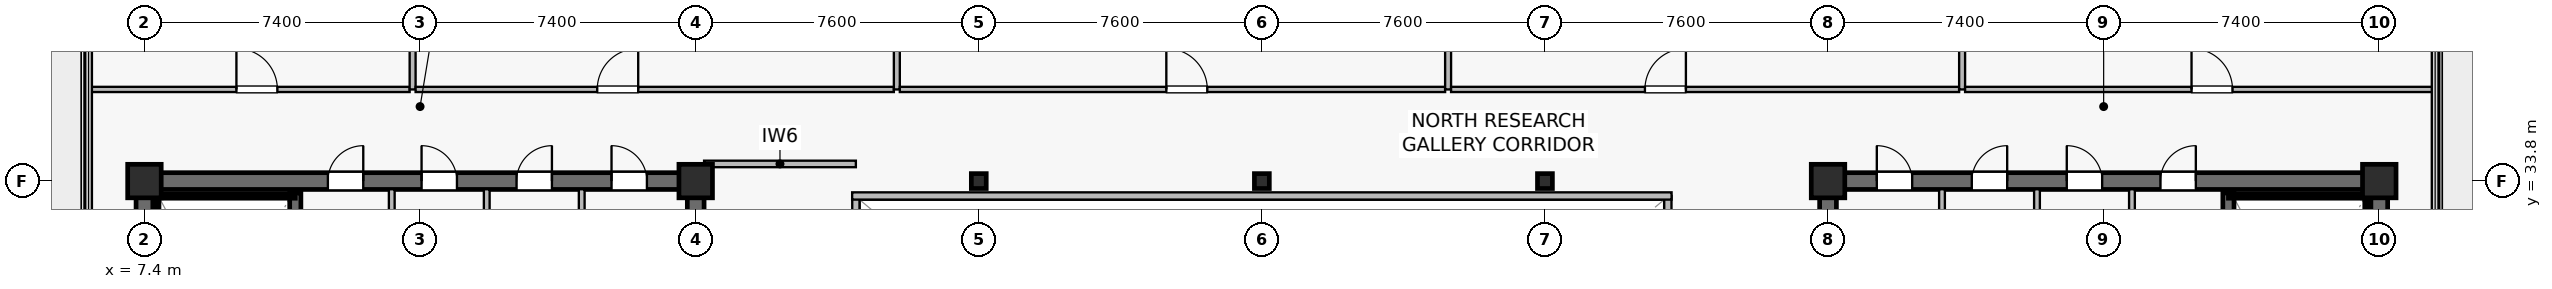
"""IFC4 building model, lengths in metres.
Left out: names, types, materials, properties, quantities, classifications, styles, units other than length and angle.
Written with IfcOpenShell. Run it as: python <this file> out.ifc"""

import sys

from ifc_helpers import new_model, si_unit, direction, frame, frame_2d, origin, origin_2d, place, context, subcontext, project, spatial, rectangle, i_section, extrude, source, transform, mapped, element, fill, save


model = new_model("IFC4")
c1 = context("Model", 3, precision=1e-05, world=origin(), true_north=direction((0.0, 1.0)))
c2 = subcontext(c1, "Body", "Model", "MODEL_VIEW")
j1 = project(units=[si_unit("LENGTHUNIT", "METRE"), si_unit("PLANEANGLEUNIT", "RADIAN")], contexts=[c1])
p1 = place(None, origin())
s1 = spatial("IfcSite", under=j1, at=p1, CompositionType="ELEMENT")
p2 = place(p1, origin())
s2 = spatial("IfcBuilding", under=s1, at=p2, CompositionType="ELEMENT")
p3 = place(p2, frame((0.0, 0.0, 297.6)))
s3 = spatial("IfcBuildingStorey", under=s2, at=p3, CompositionType="ELEMENT", Elevation=297.6)
p4 = place(p3, frame((7.175, 33.8, 0.0), z_axis=(0.0, 0.0, 1.0), x_axis=(1.0, 0.0, 0.0)))
e1 = element("IfcWall", 1, at=p4, inside=s3, PredefinedType="SHEAR", context=c2, shape_type="SweptSolid", body=[
    extrude(rectangle(XDim=15.25, YDim=0.45, at=frame_2d((7.625, 0.0))), origin(), (0.0, 0.0, 1.0), 3.9),
])
p5 = place(p4, frame((5.15, 0.0, 0.0)))
e2 = element("IfcOpeningElement", 2, at=p5, cuts=e1, PredefinedType="OPENING", context=c2, shape_type="SweptSolid", body=[
    extrude(rectangle(XDim=0.95, YDim=2.15, at=frame_2d((0.475, 1.075))), frame((0.0, 0.235, 0.0), z_axis=(0.0, -1.0, 0.0), x_axis=(1.0, 0.0, 0.0)), (0.0, 0.0, 1.0), 0.47),
])
p6 = place(p4, frame((7.665, 0.0, 0.0)))
e3 = element("IfcOpeningElement", 3, at=p6, cuts=e1, PredefinedType="OPENING", context=c2, shape_type="SweptSolid", body=[
    extrude(rectangle(XDim=0.95, YDim=2.15, at=frame_2d((0.475, 1.075))), frame((0.0, 0.235, 0.0), z_axis=(0.0, -1.0, 0.0), x_axis=(1.0, 0.0, 0.0)), (0.0, 0.0, 1.0), 0.47),
])
p7 = place(p4, frame((10.215, 0.0, 0.0)))
e4 = element("IfcOpeningElement", 4, at=p7, cuts=e1, PredefinedType="OPENING", context=c2, shape_type="SweptSolid", body=[
    extrude(rectangle(XDim=0.95, YDim=2.15, at=frame_2d((0.475, 1.075))), frame((0.0, 0.235, 0.0), z_axis=(0.0, -1.0, 0.0), x_axis=(1.0, 0.0, 0.0)), (0.0, 0.0, 1.0), 0.47),
])
p8 = place(p4, frame((12.765, 0.0, 0.0)))
e5 = element("IfcOpeningElement", 5, at=p8, cuts=e1, PredefinedType="OPENING", context=c2, shape_type="SweptSolid", body=[
    extrude(rectangle(XDim=0.95, YDim=2.15, at=frame_2d((0.475, 1.075))), frame((0.0, 0.235, 0.0), z_axis=(0.0, -1.0, 0.0), x_axis=(1.0, 0.0, 0.0)), (0.0, 0.0, 1.0), 0.47),
])
p9 = place(p3, frame((7.4, 15.025, 0.0), z_axis=(0.0, 0.0, 1.0), x_axis=(0.0, 1.0, 0.0)))
e6 = element("IfcWall", 6, at=p9, inside=s3, PredefinedType="SHEAR", context=c2, shape_type="SweptSolid", body=[
    extrude(rectangle(XDim=18.55, YDim=0.45, at=frame_2d((9.275, 0.0))), origin(), (0.0, 0.0, 1.0), 3.9),
])
p10 = place(p3, frame((22.2, 15.025, 0.0), z_axis=(0.0, 0.0, 1.0), x_axis=(0.0, 1.0, 0.0)))
e7 = element("IfcWall", 7, at=p10, inside=s3, PredefinedType="SHEAR", context=c2, shape_type="SweptSolid", body=[
    extrude(rectangle(XDim=18.55, YDim=0.45, at=frame_2d((9.275, 0.0))), origin(), (0.0, 0.0, 1.0), 3.9),
])
p11 = place(p10, frame((3.525, 0.0, 0.0)))
e8 = element("IfcOpeningElement", 8, at=p11, cuts=e7, PredefinedType="OPENING", context=c2, shape_type="SweptSolid", body=[
    extrude(rectangle(XDim=1.42, YDim=2.2, at=frame_2d((0.71, 1.1))), frame((0.0, 0.235, 0.0), z_axis=(0.0, -1.0, 0.0), x_axis=(1.0, 0.0, 0.0)), (0.0, 0.0, 1.0), 0.47),
])
p12 = place(p3, frame((11.45, 24.85, 0.0), z_axis=(0.0, 0.0, 1.0), x_axis=(0.0, 1.0, 0.0)))
e9 = element("IfcWall", 9, at=p12, inside=s3, PredefinedType="SHEAR", context=c2, shape_type="SweptSolid", body=[
    extrude(rectangle(XDim=8.63, YDim=0.3, at=frame_2d((4.315, 0.0))), origin(), (0.0, 0.0, 1.0), 3.9),
])
p13 = place(p12, frame((0.42, 0.0, 0.0)))
e10 = element("IfcOpeningElement", 10, at=p13, cuts=e9, PredefinedType="OPENING", context=c2, shape_type="SweptSolid", body=[
    extrude(rectangle(XDim=1.1, YDim=2.15, at=frame_2d((0.55, 1.075))), frame((0.0, 0.16, 0.0), z_axis=(0.0, -1.0, 0.0), x_axis=(1.0, 0.0, 0.0)), (0.0, 0.0, 1.0), 0.32),
])
p14 = place(p3, frame((7.73, 33.4, 0.0), z_axis=(0.0, 0.0, 1.0), x_axis=(1.0, 0.0, 0.0)))
e11 = element("IfcWall", 11, at=p14, inside=s3, PredefinedType="SOLIDWALL", context=c2, shape_type="SweptSolid", body=[
    extrude(rectangle(XDim=3.72, YDim=0.12, at=frame_2d((1.86, 0.0))), origin(), (0.0, 0.0, 1.0), 3.9),
])
p15 = place(p3, frame((7.73, 25.0, 0.0), z_axis=(0.0, 0.0, 1.0), x_axis=(0.0, 1.0, 0.0)))
e12 = element("IfcWall", 12, at=p15, inside=s3, PredefinedType="SOLIDWALL", context=c2, shape_type="SweptSolid", body=[
    extrude(rectangle(XDim=8.32, YDim=0.12, at=frame_2d((4.16, 0.0))), origin(), (0.0, 0.0, 1.0), 3.9),
])
p16 = place(p3, frame((52.375, 33.8, 0.0), z_axis=(0.0, 0.0, 1.0), x_axis=(1.0, 0.0, 0.0)))
e13 = element("IfcWall", 13, at=p16, inside=s3, PredefinedType="SHEAR", context=c2, shape_type="SweptSolid", body=[
    extrude(rectangle(XDim=15.25, YDim=0.45, at=frame_2d((7.625, 0.0))), origin(), (0.0, 0.0, 1.0), 3.9),
])
p17 = place(p16, frame((9.15, 0.0, 0.0)))
e14 = element("IfcOpeningElement", 14, at=p17, cuts=e13, PredefinedType="OPENING", context=c2, shape_type="SweptSolid", body=[
    extrude(rectangle(XDim=0.95, YDim=2.15, at=frame_2d((0.475, 1.075))), frame((0.0, 0.235, 0.0), z_axis=(0.0, -1.0, 0.0), x_axis=(1.0, 0.0, 0.0)), (0.0, 0.0, 1.0), 0.47),
])
p18 = place(p16, frame((6.635, 0.0, 0.0)))
e15 = element("IfcOpeningElement", 15, at=p18, cuts=e13, PredefinedType="OPENING", context=c2, shape_type="SweptSolid", body=[
    extrude(rectangle(XDim=0.95, YDim=2.15, at=frame_2d((0.475, 1.075))), frame((0.0, 0.235, 0.0), z_axis=(0.0, -1.0, 0.0), x_axis=(1.0, 0.0, 0.0)), (0.0, 0.0, 1.0), 0.47),
])
p19 = place(p16, frame((4.085, 0.0, 0.0)))
e16 = element("IfcOpeningElement", 16, at=p19, cuts=e13, PredefinedType="OPENING", context=c2, shape_type="SweptSolid", body=[
    extrude(rectangle(XDim=0.95, YDim=2.15, at=frame_2d((0.475, 1.075))), frame((0.0, 0.235, 0.0), z_axis=(0.0, -1.0, 0.0), x_axis=(1.0, 0.0, 0.0)), (0.0, 0.0, 1.0), 0.47),
])
p20 = place(p16, frame((1.535, 0.0, 0.0)))
e17 = element("IfcOpeningElement", 17, at=p20, cuts=e13, PredefinedType="OPENING", context=c2, shape_type="SweptSolid", body=[
    extrude(rectangle(XDim=0.95, YDim=2.15, at=frame_2d((0.475, 1.075))), frame((0.0, 0.235, 0.0), z_axis=(0.0, -1.0, 0.0), x_axis=(1.0, 0.0, 0.0)), (0.0, 0.0, 1.0), 0.47),
])
p21 = place(p3, frame((52.6, 15.025, 0.0), z_axis=(0.0, 0.0, 1.0), x_axis=(0.0, 1.0, 0.0)))
e18 = element("IfcWall", 18, at=p21, inside=s3, PredefinedType="SHEAR", context=c2, shape_type="SweptSolid", body=[
    extrude(rectangle(XDim=18.55, YDim=0.45, at=frame_2d((9.275, 0.0))), origin(), (0.0, 0.0, 1.0), 3.9),
])
p22 = place(p21, frame((3.525, 0.0, 0.0)))
e19 = element("IfcOpeningElement", 19, at=p22, cuts=e18, PredefinedType="OPENING", context=c2, shape_type="SweptSolid", body=[
    extrude(rectangle(XDim=1.42, YDim=2.2, at=frame_2d((0.71, 1.1))), frame((0.0, 0.235, 0.0), z_axis=(0.0, -1.0, 0.0), x_axis=(1.0, 0.0, 0.0)), (0.0, 0.0, 1.0), 0.47),
])
p23 = place(p3, frame((67.4, 15.025, 0.0), z_axis=(0.0, 0.0, 1.0), x_axis=(0.0, 1.0, 0.0)))
e20 = element("IfcWall", 20, at=p23, inside=s3, PredefinedType="SHEAR", context=c2, shape_type="SweptSolid", body=[
    extrude(rectangle(XDim=18.55, YDim=0.45, at=frame_2d((9.275, 0.0))), origin(), (0.0, 0.0, 1.0), 3.9),
])
p24 = place(p3, frame((63.35, 24.85, 0.0), z_axis=(0.0, 0.0, 1.0), x_axis=(0.0, 1.0, 0.0)))
e21 = element("IfcWall", 21, at=p24, inside=s3, PredefinedType="SHEAR", context=c2, shape_type="SweptSolid", body=[
    extrude(rectangle(XDim=8.63, YDim=0.3, at=frame_2d((4.315, 0.0))), origin(), (0.0, 0.0, 1.0), 3.9),
])
p25 = place(p24, frame((0.42, 0.0, 0.0)))
e22 = element("IfcOpeningElement", 22, at=p25, cuts=e21, PredefinedType="OPENING", context=c2, shape_type="SweptSolid", body=[
    extrude(rectangle(XDim=1.1, YDim=2.15, at=frame_2d((0.55, 1.075))), frame((0.0, 0.16, 0.0), z_axis=(0.0, -1.0, 0.0), x_axis=(1.0, 0.0, 0.0)), (0.0, 0.0, 1.0), 0.32),
])
p26 = place(p3, frame((63.35, 33.4, 0.0), z_axis=(0.0, 0.0, 1.0), x_axis=(1.0, 0.0, 0.0)))
e23 = element("IfcWall", 23, at=p26, inside=s3, PredefinedType="SOLIDWALL", context=c2, shape_type="SweptSolid", body=[
    extrude(rectangle(XDim=3.72, YDim=0.12, at=frame_2d((1.86, 0.0))), origin(), (0.0, 0.0, 1.0), 3.9),
])
p27 = place(p3, frame((67.07, 25.0, 0.0), z_axis=(0.0, 0.0, 1.0), x_axis=(0.0, 1.0, 0.0)))
e24 = element("IfcWall", 24, at=p27, inside=s3, PredefinedType="SOLIDWALL", context=c2, shape_type="SweptSolid", body=[
    extrude(rectangle(XDim=8.32, YDim=0.12, at=frame_2d((4.16, 0.0))), origin(), (0.0, 0.0, 1.0), 3.9),
])
m1 = source(origin(), c2, "Body", "SweptSolid", [
    extrude(rectangle(XDim=0.9, YDim=0.9, at=origin_2d()), origin(), (0.0, 0.0, 1.0), 4.2),
])
for number, where, z_axis, x_axis in (
    (25, (7.4, 33.8, 0.0), (0.0, 0.0, 1.0), (1.0, 0.0, 0.0)),
    (26, (22.2, 33.8, 0.0), (0.0, 0.0, 1.0), (1.0, 0.0, 0.0)),
    (27, (52.6, 33.8, 0.0), (0.0, 0.0, 1.0), (1.0, 0.0, 0.0)),
    (28, (67.4, 33.8, 0.0), (0.0, 0.0, 1.0), (1.0, 0.0, 0.0)),
):
    element("IfcColumn", number, at=place(p3, frame(where, z_axis=z_axis, x_axis=x_axis)), inside=s3, PredefinedType="COLUMN", context=c2, shape_type="MappedRepresentation", body=[
        mapped(m1, transform((0.0, 0.0, 0.0), scale=1.0)),
    ])
m2 = source(origin(), c2, "Body", "SweptSolid", [
    extrude(i_section(OverallWidth=0.4, OverallDepth=0.4, WebThickness=0.021, FlangeThickness=0.021, at=origin_2d()), origin(), (0.0, 0.0, 1.0), 4.2),
])
for number, where, z_axis, x_axis in (
    (29, (29.8, 33.8, 0.0), (0.0, 0.0, 1.0), (1.0, 0.0, 0.0)),
    (30, (37.4, 33.8, 0.0), (0.0, 0.0, 1.0), (1.0, 0.0, 0.0)),
    (31, (45.0, 33.8, 0.0), (0.0, 0.0, 1.0), (1.0, 0.0, 0.0)),
):
    element("IfcColumn", number, at=place(p3, frame(where, z_axis=z_axis, x_axis=x_axis)), inside=s3, PredefinedType="COLUMN", context=c2, shape_type="MappedRepresentation", body=[
        mapped(m2, transform((0.0, 0.0, 0.0), scale=1.0)),
    ])
for number, where, z_axis, x_axis in (
    (32, (14.04, 29.65, 0.0), (0.0, 0.0, 1.0), (0.0, 1.0, 0.0)),
    (33, (16.59, 29.65, 0.0), (0.0, 0.0, 1.0), (0.0, 1.0, 0.0)),
    (34, (19.14, 29.65, 0.0), (0.0, 0.0, 1.0), (0.0, 1.0, 0.0)),
    (35, (60.76, 29.65, 0.0), (0.0, 0.0, 1.0), (0.0, 1.0, 0.0)),
    (36, (58.21, 29.65, 0.0), (0.0, 0.0, 1.0), (0.0, 1.0, 0.0)),
    (37, (55.66, 29.65, 0.0), (0.0, 0.0, 1.0), (0.0, 1.0, 0.0)),
):
    element("IfcWall", number, at=place(p3, frame(where, z_axis=z_axis, x_axis=x_axis)), inside=s3, PredefinedType="PLUMBINGWALL", context=c2, shape_type="SweptSolid", body=[
        extrude(rectangle(XDim=3.93, YDim=0.155, at=frame_2d((1.965, 0.0))), origin(), (0.0, 0.0, 1.0), 3.9),
    ])
p28 = place(p3, frame((22.425, 34.26, 0.0), z_axis=(0.0, 0.0, 1.0), x_axis=(1.0, 0.0, 0.0)))
e38 = element("IfcWall", 38, at=p28, inside=s3, PredefinedType="PARTITIONING", context=c2, shape_type="SweptSolid", body=[
    extrude(rectangle(XDim=4.075, YDim=0.175, at=frame_2d((2.038, 0.0))), origin(), (0.0, 0.0, 1.0), 3.635),
])
p29 = place(p3, frame((26.5, 15.2, 0.0), z_axis=(0.0, 0.0, 1.0), x_axis=(0.0, 1.0, 0.0)))
e39 = element("IfcWall", 39, at=p29, inside=s3, PredefinedType="SOLIDWALL", context=c2, shape_type="SweptSolid", body=[
    extrude(rectangle(XDim=18.2, YDim=0.195, at=frame_2d((9.1, 0.0))), origin(), (0.0, 0.0, 1.0), 3.9),
])
p30 = place(p29, frame((1.8, 0.0, 0.9)))
e40 = element("IfcOpeningElement", 40, at=p30, cuts=e39, PredefinedType="OPENING", context=c2, shape_type="SweptSolid", body=[
    extrude(rectangle(XDim=1.2, YDim=1.35, at=frame_2d((0.6, 0.675))), frame((0.0, 0.107, 0.0), z_axis=(0.0, -1.0, 0.0), x_axis=(1.0, 0.0, 0.0)), (0.0, 0.0, 1.0), 0.215),
])
p31 = place(p29, frame((13.2, 0.0, 0.9)))
e41 = element("IfcOpeningElement", 41, at=p31, cuts=e39, PredefinedType="OPENING", context=c2, shape_type="SweptSolid", body=[
    extrude(rectangle(XDim=1.2, YDim=1.35, at=frame_2d((0.6, 0.675))), frame((0.0, 0.107, 0.0), z_axis=(0.0, -1.0, 0.0), x_axis=(1.0, 0.0, 0.0)), (0.0, 0.0, 1.0), 0.215),
])
p32 = place(p3, frame((48.3, 15.2, 0.0), z_axis=(0.0, 0.0, 1.0), x_axis=(0.0, 1.0, 0.0)))
e42 = element("IfcWall", 42, at=p32, inside=s3, PredefinedType="SOLIDWALL", context=c2, shape_type="SweptSolid", body=[
    extrude(rectangle(XDim=18.2, YDim=0.195, at=frame_2d((9.1, 0.0))), origin(), (0.0, 0.0, 1.0), 3.9),
])
p33 = place(p32, frame((1.8, 0.0, 0.9)))
e43 = element("IfcOpeningElement", 43, at=p33, cuts=e42, PredefinedType="OPENING", context=c2, shape_type="SweptSolid", body=[
    extrude(rectangle(XDim=1.2, YDim=1.35, at=frame_2d((0.6, 0.675))), frame((0.0, 0.107, 0.0), z_axis=(0.0, -1.0, 0.0), x_axis=(1.0, 0.0, 0.0)), (0.0, 0.0, 1.0), 0.215),
])
p34 = place(p32, frame((13.2, 0.0, 0.9)))
e44 = element("IfcOpeningElement", 44, at=p34, cuts=e42, PredefinedType="OPENING", context=c2, shape_type="SweptSolid", body=[
    extrude(rectangle(XDim=1.2, YDim=1.35, at=frame_2d((0.6, 0.675))), frame((0.0, 0.107, 0.0), z_axis=(0.0, -1.0, 0.0), x_axis=(1.0, 0.0, 0.0)), (0.0, 0.0, 1.0), 0.215),
])
p35 = place(p3, frame((26.4, 33.4, 0.0), z_axis=(0.0, 0.0, 1.0), x_axis=(1.0, 0.0, 0.0)))
e45 = element("IfcWall", 45, at=p35, inside=s3, PredefinedType="SOLIDWALL", context=c2, shape_type="SweptSolid", body=[
    extrude(rectangle(XDim=22.0, YDim=0.195, at=frame_2d((11.0, 0.0))), origin(), (0.0, 0.0, 1.0), 3.9),
])
p36 = place(p3, frame((5.91, 36.26, 0.0), z_axis=(0.0, 0.0, 1.0), x_axis=(1.0, 0.0, 0.0)))
e46 = element("IfcWall", 46, at=p36, inside=s3, PredefinedType="PARTITIONING", context=c2, shape_type="SweptSolid", body=[
    extrude(rectangle(XDim=8.61, YDim=0.14, at=frame_2d((4.305, 0.0))), origin(), (0.0, 0.0, 1.0), 3.9),
])
p37 = place(p36, frame((3.959, 0.0, 0.0)))
e47 = element("IfcOpeningElement", 47, at=p37, cuts=e46, PredefinedType="OPENING", context=c2, shape_type="SweptSolid", body=[
    extrude(rectangle(XDim=1.1, YDim=2.18, at=frame_2d((0.55, 1.09))), frame((0.0, 0.08, 0.0), z_axis=(0.0, -1.0, 0.0), x_axis=(1.0, 0.0, 0.0)), (0.0, 0.0, 1.0), 0.16),
])
p38 = place(p3, frame((14.6, 36.26, 0.0), z_axis=(0.0, 0.0, 1.0), x_axis=(0.0, 1.0, 0.0)))
e48 = element("IfcWall", 48, at=p38, inside=s3, PredefinedType="PARTITIONING", context=c2, shape_type="SweptSolid", body=[
    extrude(rectangle(XDim=8.53, YDim=0.16, at=frame_2d((4.265, 0.0))), origin(), (0.0, 0.0, 1.0), 3.297),
])
p39 = place(p3, frame((14.68, 36.26, 0.0), z_axis=(0.0, 0.0, 1.0), x_axis=(1.0, 0.0, 0.0)))
e49 = element("IfcWall", 49, at=p39, inside=s3, PredefinedType="PARTITIONING", context=c2, shape_type="SweptSolid", body=[
    extrude(rectangle(XDim=12.84, YDim=0.14, at=frame_2d((6.42, 0.0))), origin(), (0.0, 0.0, 1.0), 3.297),
])
p40 = place(p39, frame((4.876, 0.0, 0.0)))
e50 = element("IfcOpeningElement", 50, at=p40, cuts=e49, PredefinedType="OPENING", context=c2, shape_type="SweptSolid", body=[
    extrude(rectangle(XDim=1.1, YDim=2.18, at=frame_2d((0.55, 1.09))), frame((0.0, 0.08, 0.0), z_axis=(0.0, -1.0, 0.0), x_axis=(1.0, 0.0, 0.0)), (0.0, 0.0, 1.0), 0.16),
])
p41 = place(p3, frame((27.6, 36.26, 0.0), z_axis=(0.0, 0.0, 1.0), x_axis=(0.0, 1.0, 0.0)))
e51 = element("IfcWall", 51, at=p41, inside=s3, PredefinedType="PARTITIONING", context=c2, shape_type="SweptSolid", body=[
    extrude(rectangle(XDim=7.53, YDim=0.16, at=frame_2d((3.765, 0.0))), origin(), (0.0, 0.0, 1.0), 2.985),
])
p42 = place(p3, frame((27.68, 36.26, 0.0), z_axis=(0.0, 0.0, 1.0), x_axis=(1.0, 0.0, 0.0)))
e52 = element("IfcWall", 52, at=p42, inside=s3, PredefinedType="PARTITIONING", context=c2, shape_type="SweptSolid", body=[
    extrude(rectangle(XDim=14.64, YDim=0.14, at=frame_2d((7.32, 0.0))), origin(), (0.0, 0.0, 1.0), 3.297),
])
p43 = place(p42, frame((7.155, 0.0, 0.0)))
e53 = element("IfcOpeningElement", 53, at=p43, cuts=e52, PredefinedType="OPENING", context=c2, shape_type="SweptSolid", body=[
    extrude(rectangle(XDim=1.1, YDim=2.18, at=frame_2d((0.55, 1.09))), frame((0.0, 0.08, 0.0), z_axis=(0.0, -1.0, 0.0), x_axis=(1.0, 0.0, 0.0)), (0.0, 0.0, 1.0), 0.16),
])
p44 = place(p3, frame((42.4, 36.26, 0.0), z_axis=(0.0, 0.0, 1.0), x_axis=(0.0, 1.0, 0.0)))
e54 = element("IfcWall", 54, at=p44, inside=s3, PredefinedType="PARTITIONING", context=c2, shape_type="SweptSolid", body=[
    extrude(rectangle(XDim=7.53, YDim=0.16, at=frame_2d((3.765, 0.0))), origin(), (0.0, 0.0, 1.0), 2.985),
])
p45 = place(p3, frame((42.48, 36.26, 0.0), z_axis=(0.0, 0.0, 1.0), x_axis=(1.0, 0.0, 0.0)))
e55 = element("IfcWall", 55, at=p45, inside=s3, PredefinedType="PARTITIONING", context=c2, shape_type="SweptSolid", body=[
    extrude(rectangle(XDim=13.64, YDim=0.14, at=frame_2d((6.82, 0.0))), origin(), (0.0, 0.0, 1.0), 3.297),
])
p46 = place(p45, frame((5.204, 0.0, 0.0)))
e56 = element("IfcOpeningElement", 56, at=p46, cuts=e55, PredefinedType="OPENING", context=c2, shape_type="SweptSolid", body=[
    extrude(rectangle(XDim=1.1, YDim=2.18, at=frame_2d((0.55, 1.09))), frame((0.0, 0.08, 0.0), z_axis=(0.0, -1.0, 0.0), x_axis=(1.0, 0.0, 0.0)), (0.0, 0.0, 1.0), 0.16),
])
p47 = place(p3, frame((56.2, 36.26, 0.0), z_axis=(0.0, 0.0, 1.0), x_axis=(0.0, 1.0, 0.0)))
e57 = element("IfcWall", 57, at=p47, inside=s3, PredefinedType="PARTITIONING", context=c2, shape_type="SweptSolid", body=[
    extrude(rectangle(XDim=8.53, YDim=0.16, at=frame_2d((4.265, 0.0))), origin(), (0.0, 0.0, 1.0), 3.235),
])
p48 = place(p3, frame((56.28, 36.26, 0.0), z_axis=(0.0, 0.0, 1.0), x_axis=(1.0, 0.0, 0.0)))
e58 = element("IfcWall", 58, at=p48, inside=s3, PredefinedType="PARTITIONING", context=c2, shape_type="SweptSolid", body=[
    extrude(rectangle(XDim=12.61, YDim=0.14, at=frame_2d((6.305, 0.0))), origin(), (0.0, 0.0, 1.0), 3.297),
])
p49 = place(p48, frame((6.079, 0.0, 0.0)))
e59 = element("IfcOpeningElement", 59, at=p49, cuts=e58, PredefinedType="OPENING", context=c2, shape_type="SweptSolid", body=[
    extrude(rectangle(XDim=1.1, YDim=2.18, at=frame_2d((0.55, 1.09))), frame((0.0, 0.08, 0.0), z_axis=(0.0, -1.0, 0.0), x_axis=(1.0, 0.0, 0.0)), (0.0, 0.0, 1.0), 0.16),
])
m3 = source(origin(), c2, "Body", "SweptSolid", [
    extrude(rectangle(XDim=0.95, YDim=2.15, at=frame_2d((0.475, 1.075))), frame((0.0, 0.025, 0.0), z_axis=(0.0, -1.0, 0.0), x_axis=(1.0, 0.0, 0.0)), (0.0, 0.0, 1.0), 0.05),
])
p50 = place(p5, origin())
e60 = element("IfcDoor", 60, at=p50, inside=s3, OperationType="SINGLE_SWING_RIGHT", PredefinedType="DOOR", context=c2, shape_type="MappedRepresentation", body=[
    mapped(m3, transform((0.0, 0.0, 0.0), scale=1.0)),
])
fill(e2, e60)
p51 = place(p6, origin())
e61 = element("IfcDoor", 61, at=p51, inside=s3, OperationType="SINGLE_SWING_LEFT", PredefinedType="DOOR", context=c2, shape_type="MappedRepresentation", body=[
    mapped(m3, transform((0.0, 0.0, 0.0), scale=1.0)),
])
fill(e3, e61)
p52 = place(p7, origin())
e62 = element("IfcDoor", 62, at=p52, inside=s3, OperationType="SINGLE_SWING_RIGHT", PredefinedType="DOOR", context=c2, shape_type="MappedRepresentation", body=[
    mapped(m3, transform((0.0, 0.0, 0.0), scale=1.0)),
])
fill(e4, e62)
p53 = place(p8, origin())
e63 = element("IfcDoor", 63, at=p53, inside=s3, OperationType="SINGLE_SWING_LEFT", PredefinedType="DOOR", context=c2, shape_type="MappedRepresentation", body=[
    mapped(m3, transform((0.0, 0.0, 0.0), scale=1.0)),
])
fill(e5, e63)
p54 = place(p17, origin())
e64 = element("IfcDoor", 64, at=p54, inside=s3, OperationType="SINGLE_SWING_RIGHT", PredefinedType="DOOR", context=c2, shape_type="MappedRepresentation", body=[
    mapped(m3, transform((0.0, 0.0, 0.0), scale=1.0)),
])
fill(e14, e64)
p55 = place(p18, origin())
e65 = element("IfcDoor", 65, at=p55, inside=s3, OperationType="SINGLE_SWING_LEFT", PredefinedType="DOOR", context=c2, shape_type="MappedRepresentation", body=[
    mapped(m3, transform((0.0, 0.0, 0.0), scale=1.0)),
])
fill(e15, e65)
p56 = place(p19, origin())
e66 = element("IfcDoor", 66, at=p56, inside=s3, OperationType="SINGLE_SWING_RIGHT", PredefinedType="DOOR", context=c2, shape_type="MappedRepresentation", body=[
    mapped(m3, transform((0.0, 0.0, 0.0), scale=1.0)),
])
fill(e16, e66)
p57 = place(p20, origin())
e67 = element("IfcDoor", 67, at=p57, inside=s3, OperationType="SINGLE_SWING_LEFT", PredefinedType="DOOR", context=c2, shape_type="MappedRepresentation", body=[
    mapped(m3, transform((0.0, 0.0, 0.0), scale=1.0)),
])
fill(e17, e67)
m4 = source(origin(), c2, "Body", "SweptSolid", [
    extrude(rectangle(XDim=1.1, YDim=2.18, at=frame_2d((0.55, 1.09))), frame((0.0, 0.025, 0.0), z_axis=(0.0, -1.0, 0.0), x_axis=(1.0, 0.0, 0.0)), (0.0, 0.0, 1.0), 0.05),
])
p58 = place(p37, origin())
e68 = element("IfcDoor", 68, at=p58, inside=s3, OperationType="SINGLE_SWING_LEFT", PredefinedType="DOOR", context=c2, shape_type="MappedRepresentation", body=[
    mapped(m4, transform((0.0, 0.0, 0.0), scale=1.0)),
])
fill(e47, e68)
p59 = place(p40, origin())
e69 = element("IfcDoor", 69, at=p59, inside=s3, OperationType="SINGLE_SWING_RIGHT", PredefinedType="DOOR", context=c2, shape_type="MappedRepresentation", body=[
    mapped(m4, transform((0.0, 0.0, 0.0), scale=1.0)),
])
fill(e50, e69)
p60 = place(p43, origin())
e70 = element("IfcDoor", 70, at=p60, inside=s3, OperationType="SINGLE_SWING_LEFT", PredefinedType="DOOR", context=c2, shape_type="MappedRepresentation", body=[
    mapped(m4, transform((0.0, 0.0, 0.0), scale=1.0)),
])
fill(e53, e70)
p61 = place(p46, origin())
e71 = element("IfcDoor", 71, at=p61, inside=s3, OperationType="SINGLE_SWING_RIGHT", PredefinedType="DOOR", context=c2, shape_type="MappedRepresentation", body=[
    mapped(m4, transform((0.0, 0.0, 0.0), scale=1.0)),
])
fill(e56, e71)
p62 = place(p49, origin())
e72 = element("IfcDoor", 72, at=p62, inside=s3, OperationType="SINGLE_SWING_LEFT", PredefinedType="DOOR", context=c2, shape_type="MappedRepresentation", body=[
    mapped(m4, transform((0.0, 0.0, 0.0), scale=1.0)),
])
fill(e59, e72)
save(model, sys.argv[1])
